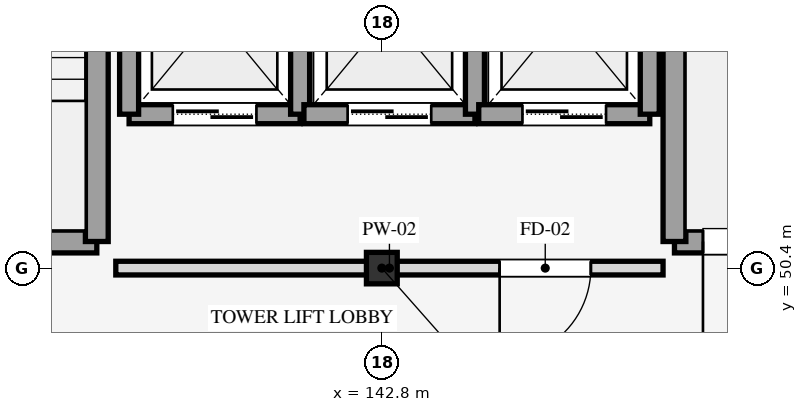
"""IFC4 building model, lengths in metres.
Left out: names, types, materials, properties, quantities, classifications, styles, units other than length and angle.
Written with IfcOpenShell. Run it as: python <this file> out.ifc"""

import sys

from ifc_helpers import new_model, si_unit, direction, frame, frame_2d, origin, origin_2d, place, context, subcontext, project, spatial, rectangle, i_section, extrude, element, fill, save


model = new_model("IFC4")
c1 = context("Model", 3, precision=1e-05, world=origin(), true_north=direction((0.0, 1.0)))
c2 = subcontext(c1, "Body", "Model", "MODEL_VIEW")
j1 = project(units=[si_unit("LENGTHUNIT", "METRE"), si_unit("PLANEANGLEUNIT", "RADIAN")], contexts=[c1])
p1 = place(None, origin())
s1 = spatial("IfcSite", under=j1, at=p1, CompositionType="ELEMENT")
p2 = place(p1, origin())
s2 = spatial("IfcBuilding", under=s1, at=p2, CompositionType="ELEMENT")
p3 = place(p2, origin())
s3 = spatial("IfcBuildingStorey", under=s2, at=p3, CompositionType="ELEMENT", Elevation=0.0)
p4 = place(p3, frame((142.8, 50.4, 0.0), z_axis=(0.0, 0.0, 1.0), x_axis=(1.0, 0.0, 0.0)))
e1 = element("IfcColumn", 1, at=p4, inside=s3, PredefinedType="COLUMN", context=c2, shape_type="SweptSolid", body=[
    extrude(i_section(OverallWidth=0.405, OverallDepth=0.414, WebThickness=0.018, FlangeThickness=0.028, FilletRadius=0.022, at=origin_2d()), origin(), (0.0, 0.0, 1.0), 5.4),
])
p5 = place(p3, frame((135.05, 50.75, 0.0), z_axis=(0.0, 0.0, 1.0), x_axis=(1.0, 0.0, 0.0)))
e2 = element("IfcWall", 2, at=p5, inside=s3, PredefinedType="SHEAR", context=c2, shape_type="SweptSolid", body=[
    extrude(rectangle(XDim=4.0, YDim=0.3, at=frame_2d((2.0, 0.0))), origin(), (0.0, 0.0, 1.0), 5.4),
])
p6 = place(p5, frame((0.375, 0.0, 0.0)))
e3 = element("IfcOpeningElement", 3, at=p6, cuts=e2, PredefinedType="OPENING", context=c2, shape_type="SweptSolid", body=[
    extrude(rectangle(XDim=1.25, YDim=2.15, at=frame_2d((0.625, 1.075))), frame((0.0, 0.16, 0.0), z_axis=(0.0, -1.0, 0.0), x_axis=(1.0, 0.0, 0.0)), (0.0, 0.0, 1.0), 0.32),
])
p7 = place(p3, frame((139.05, 50.75, 0.0), z_axis=(0.0, 0.0, 1.0), x_axis=(0.0, 1.0, 0.0)))
e4 = element("IfcWall", 4, at=p7, inside=s3, PredefinedType="SHEAR", context=c2, shape_type="SweptSolid", body=[
    extrude(rectangle(XDim=14.3, YDim=0.3, at=frame_2d((7.15, 0.0))), origin(), (0.0, 0.0, 1.0), 5.4),
])
p8 = place(p3, frame((146.65, 50.75, 0.0), z_axis=(0.0, 0.0, 1.0), x_axis=(1.0, 0.0, 0.0)))
e5 = element("IfcWall", 5, at=p8, inside=s3, PredefinedType="SHEAR", context=c2, shape_type="SweptSolid", body=[
    extrude(rectangle(XDim=4.0, YDim=0.3, at=frame_2d((2.0, 0.0))), origin(), (0.0, 0.0, 1.0), 5.4),
])
p9 = place(p8, frame((0.375, 0.0, 0.0)))
e6 = element("IfcOpeningElement", 6, at=p9, cuts=e5, PredefinedType="OPENING", context=c2, shape_type="SweptSolid", body=[
    extrude(rectangle(XDim=1.25, YDim=2.15, at=frame_2d((0.625, 1.075))), frame((0.0, 0.16, 0.0), z_axis=(0.0, -1.0, 0.0), x_axis=(1.0, 0.0, 0.0)), (0.0, 0.0, 1.0), 0.32),
])
p10 = place(p3, frame((146.65, 50.75, 0.0), z_axis=(0.0, 0.0, 1.0), x_axis=(0.0, 1.0, 0.0)))
e7 = element("IfcWall", 7, at=p10, inside=s3, PredefinedType="SHEAR", context=c2, shape_type="SweptSolid", body=[
    extrude(rectangle(XDim=14.3, YDim=0.3, at=frame_2d((7.15, 0.0))), origin(), (0.0, 0.0, 1.0), 5.4),
])
p11 = place(p3, frame((139.475, 52.425, 0.0), z_axis=(0.0, 0.0, 1.0), x_axis=(1.0, 0.0, 0.0)))
e8 = element("IfcWall", 8, at=p11, inside=s3, PredefinedType="SHEAR", context=c2, shape_type="SweptSolid", body=[
    extrude(rectangle(XDim=2.25, YDim=0.25, at=frame_2d((1.125, 0.0))), origin(), (0.0, 0.0, 1.0), 5.14),
])
p12 = place(p11, frame((0.575, 0.0, 0.0)))
e9 = element("IfcOpeningElement", 9, at=p12, cuts=e8, PredefinedType="OPENING", context=c2, shape_type="SweptSolid", body=[
    extrude(rectangle(XDim=1.1, YDim=2.15, at=frame_2d((0.55, 1.075))), frame((0.0, 0.135, 0.0), z_axis=(0.0, -1.0, 0.0), x_axis=(1.0, 0.0, 0.0)), (0.0, 0.0, 1.0), 0.27),
])
for number, where, z_axis, x_axis in (
    (10, (139.475, 52.425, 0.0), (0.0, 0.0, 1.0), (0.0, 1.0, 0.0)),
    (11, (141.725, 52.425, 0.0), (0.0, 0.0, 1.0), (0.0, 1.0, 0.0)),
):
    element("IfcWall", number, at=place(p3, frame(where, z_axis=z_axis, x_axis=x_axis)), inside=s3, PredefinedType="SHEAR", context=c2, shape_type="SweptSolid", body=[
        extrude(rectangle(XDim=2.65, YDim=0.25, at=frame_2d((1.325, 0.0))), origin(), (0.0, 0.0, 1.0), 5.14),
    ])
p13 = place(p3, frame((141.775, 52.425, 0.0), z_axis=(0.0, 0.0, 1.0), x_axis=(1.0, 0.0, 0.0)))
e12 = element("IfcWall", 12, at=p13, inside=s3, PredefinedType="SHEAR", context=c2, shape_type="SweptSolid", body=[
    extrude(rectangle(XDim=2.25, YDim=0.25, at=frame_2d((1.125, 0.0))), origin(), (0.0, 0.0, 1.0), 5.14),
])
p14 = place(p13, frame((0.575, 0.0, 0.0)))
e13 = element("IfcOpeningElement", 13, at=p14, cuts=e12, PredefinedType="OPENING", context=c2, shape_type="SweptSolid", body=[
    extrude(rectangle(XDim=1.1, YDim=2.15, at=frame_2d((0.55, 1.075))), frame((0.0, 0.135, 0.0), z_axis=(0.0, -1.0, 0.0), x_axis=(1.0, 0.0, 0.0)), (0.0, 0.0, 1.0), 0.27),
])
p15 = place(p3, frame((144.025, 52.425, 0.0), z_axis=(0.0, 0.0, 1.0), x_axis=(0.0, 1.0, 0.0)))
e14 = element("IfcWall", 14, at=p15, inside=s3, PredefinedType="SHEAR", context=c2, shape_type="SweptSolid", body=[
    extrude(rectangle(XDim=2.65, YDim=0.25, at=frame_2d((1.325, 0.0))), origin(), (0.0, 0.0, 1.0), 5.14),
])
p16 = place(p3, frame((144.075, 52.425, 0.0), z_axis=(0.0, 0.0, 1.0), x_axis=(1.0, 0.0, 0.0)))
e15 = element("IfcWall", 15, at=p16, inside=s3, PredefinedType="SHEAR", context=c2, shape_type="SweptSolid", body=[
    extrude(rectangle(XDim=2.25, YDim=0.25, at=frame_2d((1.125, 0.0))), origin(), (0.0, 0.0, 1.0), 5.14),
])
p17 = place(p16, frame((0.575, 0.0, 0.0)))
e16 = element("IfcOpeningElement", 16, at=p17, cuts=e15, PredefinedType="OPENING", context=c2, shape_type="SweptSolid", body=[
    extrude(rectangle(XDim=1.1, YDim=2.15, at=frame_2d((0.55, 1.075))), frame((0.0, 0.135, 0.0), z_axis=(0.0, -1.0, 0.0), x_axis=(1.0, 0.0, 0.0)), (0.0, 0.0, 1.0), 0.27),
])
p18 = place(p3, frame((146.325, 52.425, 0.0), z_axis=(0.0, 0.0, 1.0), x_axis=(0.0, 1.0, 0.0)))
e17 = element("IfcWall", 17, at=p18, inside=s3, PredefinedType="SHEAR", context=c2, shape_type="SweptSolid", body=[
    extrude(rectangle(XDim=2.65, YDim=0.25, at=frame_2d((1.325, 0.0))), origin(), (0.0, 0.0, 1.0), 5.14),
])
p19 = place(p3, frame((139.3, 50.4, 0.0), z_axis=(0.0, 0.0, 1.0), x_axis=(1.0, 0.0, 0.0)))
e18 = element("IfcWall", 18, at=p19, inside=s3, PredefinedType="PARTITIONING", context=c2, shape_type="SweptSolid", body=[
    extrude(rectangle(XDim=7.2, YDim=0.18, at=frame_2d((3.6, 0.0))), origin(), (0.0, 0.0, 1.0), 4.44),
])
p20 = place(p19, frame((5.05, 0.0, 0.0)))
e19 = element("IfcOpeningElement", 19, at=p20, cuts=e18, PredefinedType="OPENING", context=c2, shape_type="SweptSolid", body=[
    extrude(rectangle(XDim=1.2, YDim=2.15, at=frame_2d((0.6, 1.075))), frame((0.0, 0.1, 0.0), z_axis=(0.0, -1.0, 0.0), x_axis=(1.0, 0.0, 0.0)), (0.0, 0.0, 1.0), 0.2),
])
p21 = place(p9, frame((1.25, 0.0, 0.0), z_axis=(0.0, 0.0, 1.0), x_axis=(-1.0, 0.0, 0.0)))
e20 = element("IfcDoor", 20, at=p21, inside=s3, OperationType="SINGLE_SWING_RIGHT", PredefinedType="DOOR", context=c2, shape_type="SweptSolid", body=[
    extrude(rectangle(XDim=1.25, YDim=2.15, at=frame_2d((0.625, 1.075))), frame((0.0, 0.025, 0.0), z_axis=(0.0, -1.0, 0.0), x_axis=(1.0, 0.0, 0.0)), (0.0, 0.0, 1.0), 0.05),
])
fill(e6, e20)
p22 = place(p12, origin())
e21 = element("IfcDoor", 21, at=p22, inside=s3, OperationType="DOUBLE_DOOR_SLIDING", PredefinedType="DOOR", context=c2, shape_type="SweptSolid", body=[
    extrude(rectangle(XDim=1.1, YDim=2.15, at=frame_2d((0.55, 1.075))), frame((0.0, 0.025, 0.0), z_axis=(0.0, -1.0, 0.0), x_axis=(1.0, 0.0, 0.0)), (0.0, 0.0, 1.0), 0.05),
])
fill(e9, e21)
p23 = place(p14, origin())
e22 = element("IfcDoor", 22, at=p23, inside=s3, OperationType="DOUBLE_DOOR_SLIDING", PredefinedType="DOOR", context=c2, shape_type="SweptSolid", body=[
    extrude(rectangle(XDim=1.1, YDim=2.15, at=frame_2d((0.55, 1.075))), frame((0.0, 0.025, 0.0), z_axis=(0.0, -1.0, 0.0), x_axis=(1.0, 0.0, 0.0)), (0.0, 0.0, 1.0), 0.05),
])
fill(e13, e22)
p24 = place(p17, origin())
e23 = element("IfcDoor", 23, at=p24, inside=s3, OperationType="DOUBLE_DOOR_SLIDING", PredefinedType="DOOR", context=c2, shape_type="SweptSolid", body=[
    extrude(rectangle(XDim=1.1, YDim=2.15, at=frame_2d((0.55, 1.075))), frame((0.0, 0.025, 0.0), z_axis=(0.0, -1.0, 0.0), x_axis=(1.0, 0.0, 0.0)), (0.0, 0.0, 1.0), 0.05),
])
fill(e16, e23)
p25 = place(p20, frame((1.2, 0.0, 0.0), z_axis=(0.0, 0.0, 1.0), x_axis=(-1.0, 0.0, 0.0)))
e24 = element("IfcDoor", 24, at=p25, inside=s3, OperationType="SINGLE_SWING_RIGHT", PredefinedType="DOOR", context=c2, shape_type="SweptSolid", body=[
    extrude(rectangle(XDim=1.2, YDim=2.15, at=frame_2d((0.6, 1.075))), frame((0.0, 0.025, 0.0), z_axis=(0.0, -1.0, 0.0), x_axis=(1.0, 0.0, 0.0)), (0.0, 0.0, 1.0), 0.05),
])
fill(e19, e24)
save(model, sys.argv[1])
